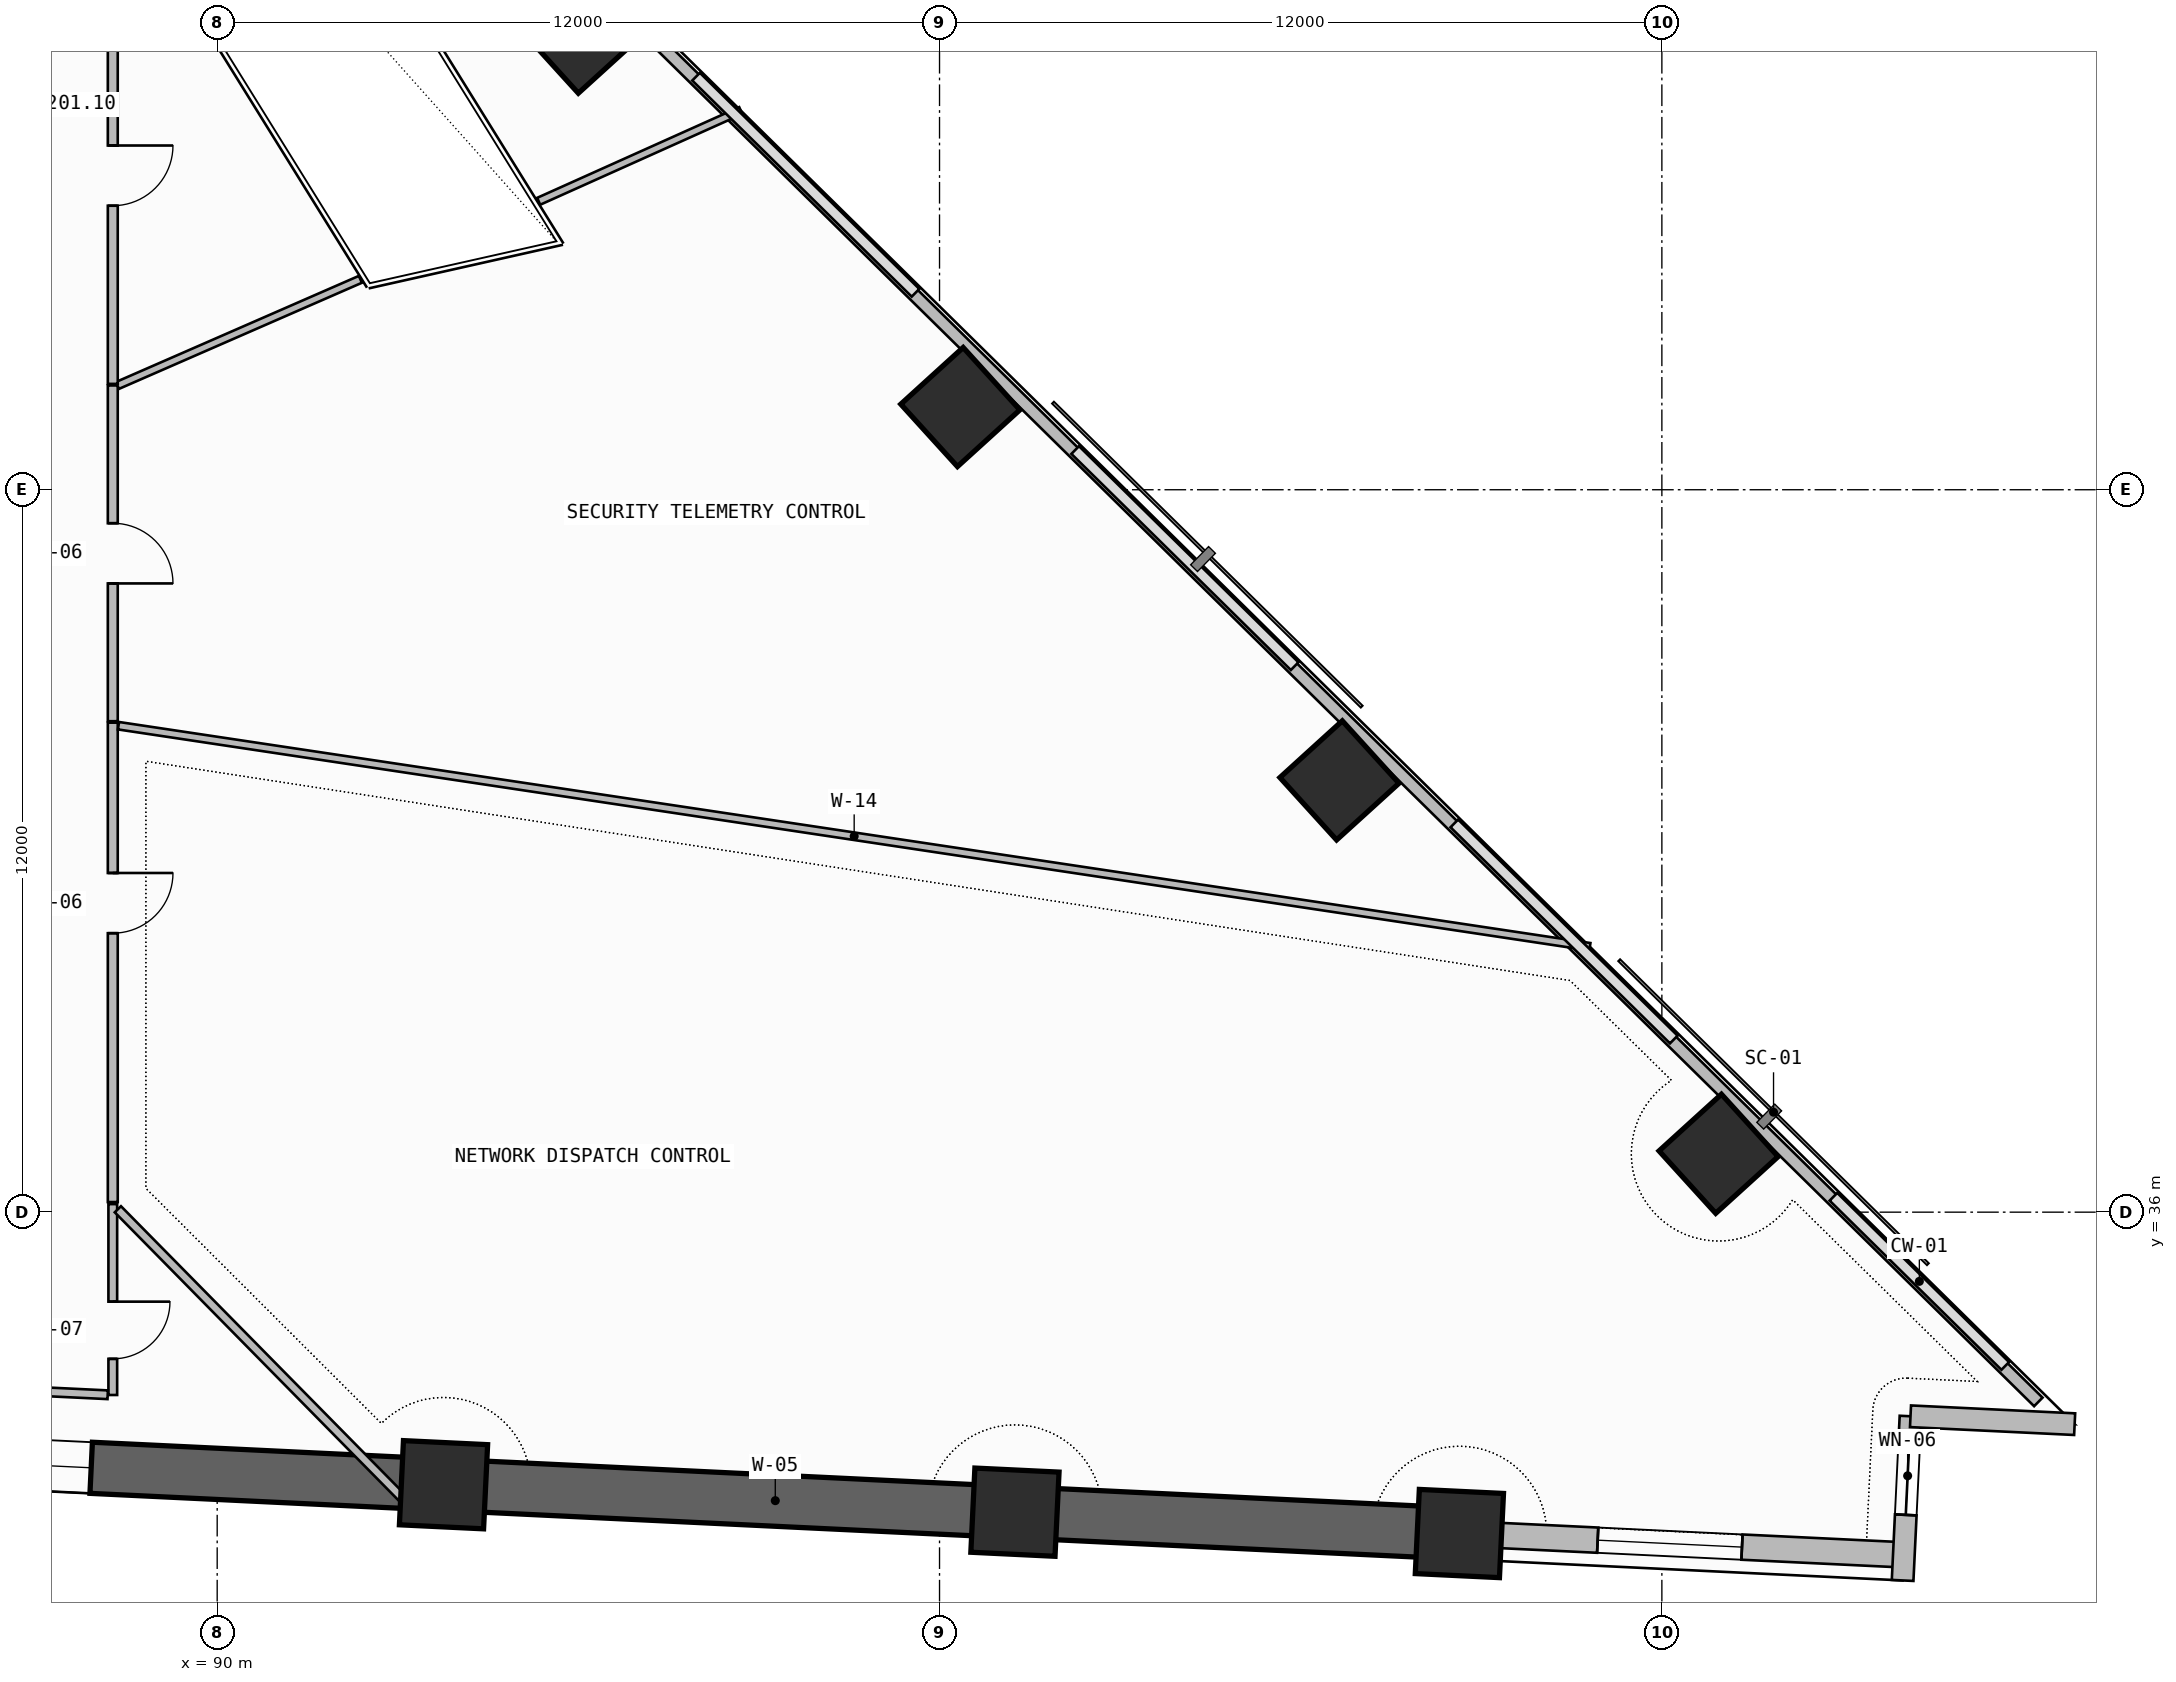
"""IFC4 building model, lengths in metres.
Left out: names, types, materials, properties, quantities, classifications, styles, units other than length and angle.
Written with IfcOpenShell. Run it as: python <this file> out.ifc"""

import sys

from ifc_helpers import new_model, si_unit, direction, frame, frame_2d, origin, origin_2d, place, context, subcontext, project, spatial, rectangle, extrude, element, fill, save


model = new_model("IFC4")
c1 = context("Model", 3, precision=1e-05, world=origin(), true_north=direction((0.0, 1.0)))
c2 = subcontext(c1, "Body", "Model", "MODEL_VIEW")
j1 = project(units=[si_unit("LENGTHUNIT", "METRE"), si_unit("PLANEANGLEUNIT", "RADIAN")], contexts=[c1])
p1 = place(None, origin())
s1 = spatial("IfcSite", under=j1, at=p1, CompositionType="ELEMENT")
p2 = place(p1, origin())
s2 = spatial("IfcBuilding", under=s1, at=p2, CompositionType="ELEMENT")
p3 = place(p2, frame((0.0, 0.0, 33.9)))
s3 = spatial("IfcBuildingStorey", under=s2, at=p3, CompositionType="ELEMENT", Elevation=33.9)
for number, where, z_axis, x_axis in (
    (1, (93.76, 31.472, 0.0), (0.0, 0.0, 1.0), (-0.999, 0.048, 0.0)),
    (2, (103.253, 31.017, 0.0), (0.0, 0.0, 1.0), (-0.999, 0.048, 0.0)),
    (3, (110.636, 30.662, 0.0), (0.0, 0.0, 1.0), (-0.999, 0.048, 0.0)),
    (4, (114.942, 36.97, 0.0), (0.0, 0.0, 1.0), (0.74, 0.672, 0.0)),
    (5, (108.644, 43.172, 0.0), (0.0, 0.0, 1.0), (0.74, 0.672, 0.0)),
    (6, (102.345, 49.374, 0.0), (0.0, 0.0, 1.0), (0.74, 0.672, 0.0)),
    (7, (96.047, 55.576, 0.0), (0.0, 0.0, 1.0), (0.74, 0.672, 0.0)),
):
    element("IfcColumn", number, at=place(p3, frame(where, z_axis=z_axis, x_axis=x_axis)), inside=s3, PredefinedType="COLUMN", context=c2, shape_type="SweptSolid", body=[
        extrude(rectangle(XDim=1.4, YDim=1.4, at=origin_2d()), origin(), (0.0, 0.0, 1.0), 3.6),
    ])
p4 = place(p3, frame((83.212, 31.979, -0.2), z_axis=(0.0, 0.0, 1.0), x_axis=(0.998848235141, -0.047981279227, 0.0)))
e8 = element("IfcWall", 8, at=p4, inside=s3, PredefinedType="SHEAR", context=c2, shape_type="SweptSolid", body=[
    extrude(rectangle(XDim=27.456, YDim=0.85, at=frame_2d((13.728, 0.0))), origin(), (0.0, 0.0, 1.0), 3.54),
])
p5 = place(p4, frame((2.3, 0.0, 1.2)))
e9 = element("IfcOpeningElement", 9, at=p5, cuts=e8, PredefinedType="OPENING", context=c2, shape_type="SweptSolid", body=[
    extrude(rectangle(XDim=2.4, YDim=0.9, at=frame_2d((1.2, 0.45))), frame((0.0, 0.435, 0.0), z_axis=(0.0, -1.0, 0.0), x_axis=(1.0, 0.0, 0.0)), (0.0, 0.0, 1.0), 0.87),
])
p6 = place(p3, frame((110.636, 30.662, 0.0), z_axis=(0.0, 0.0, 1.0), x_axis=(0.998847872759, -0.047988822508, 0.0)))
e10 = element("IfcWall", 10, at=p6, inside=s3, PredefinedType="SOLIDWALL", context=c2, shape_type="SweptSolid", body=[
    extrude(rectangle(XDim=7.392, YDim=0.42, at=frame_2d((3.696, 0.0))), origin(), (0.0, 0.0, 1.0), 2.325),
])
p7 = place(p6, frame((2.3, 0.0, 1.2)))
e11 = element("IfcOpeningElement", 11, at=p7, cuts=e10, PredefinedType="OPENING", context=c2, shape_type="SweptSolid", body=[
    extrude(rectangle(XDim=2.4, YDim=0.9, at=frame_2d((1.2, 0.45))), frame((0.0, 0.22, 0.0), z_axis=(0.0, -1.0, 0.0), x_axis=(1.0, 0.0, 0.0)), (0.0, 0.0, 1.0), 0.44),
])
p8 = place(p3, frame((118.0, 29.883, 0.0), z_axis=(0.0, 0.0, 1.0), x_axis=(0.048024030708, 0.998846180588, 0.0)))
e12 = element("IfcWall", 12, at=p8, inside=s3, PredefinedType="SOLIDWALL", context=c2, shape_type="SweptSolid", body=[
    extrude(rectangle(XDim=2.73, YDim=0.36, at=frame_2d((1.365, 0.0))), origin(), (0.0, 0.0, 1.0), 3.34),
])
p9 = place(p8, frame((1.09, 0.0, 0.45)))
e13 = element("IfcOpeningElement", 13, at=p9, cuts=e12, PredefinedType="OPENING", context=c2, shape_type="SweptSolid", body=[
    extrude(rectangle(XDim=1.3, YDim=2.4, at=frame_2d((0.65, 1.2))), frame((0.0, 0.19, 0.0), z_axis=(0.0, -1.0, 0.0), x_axis=(1.0, 0.0, 0.0)), (0.0, 0.0, 1.0), 0.38),
])
p10 = place(p3, frame((118.131, 32.61, 0.0), z_axis=(0.0, 0.0, 1.0), x_axis=(0.998846180588, -0.048024030708, 0.0)))
e14 = element("IfcWall", 14, at=p10, inside=s3, PredefinedType="SOLIDWALL", context=c2, shape_type="SweptSolid", body=[
    extrude(rectangle(XDim=2.73, YDim=0.36, at=frame_2d((1.365, 0.0))), origin(), (0.0, 0.0, 1.0), 3.34),
])
p11 = place(p3, frame((120.254, 32.848, 0.0), z_axis=(0.0, 0.0, 1.0), x_axis=(-0.71254385441, 0.701627576099, 0.0)))
e15 = element("IfcWall", 15, at=p11, inside=s3, PredefinedType="PARAPET", context=c2, shape_type="SweptSolid", body=[
    extrude(rectangle(XDim=36.142, YDim=0.2, at=frame_2d((18.071, 0.0))), origin(), (0.0, 0.0, 1.0), 1.15),
])
p12 = place(p3, frame((88.266, 32.963, 0.0), z_axis=(0.0, 0.0, 1.0), x_axis=(0.0, 1.0, 0.0)))
e16 = element("IfcWall", 16, at=p12, inside=s3, PredefinedType="PARTITIONING", context=c2, shape_type="SweptSolid", body=[
    extrude(rectangle(XDim=3.171, YDim=0.145, at=frame_2d((1.585, 0.0))), origin(), (0.0, 0.0, 1.0), 2.725),
])
p13 = place(p12, frame((0.601, 0.0, 0.0)))
e17 = element("IfcOpeningElement", 17, at=p13, cuts=e16, PredefinedType="OPENING", context=c2, shape_type="SweptSolid", body=[
    extrude(rectangle(XDim=0.95, YDim=2.15, at=frame_2d((0.475, 1.075))), frame((0.0, 0.083, 0.0), z_axis=(0.0, -1.0, 0.0), x_axis=(1.0, 0.0, 0.0)), (0.0, 0.0, 1.0), 0.165),
])
p14 = place(p3, frame((86.3, 33.057, 0.0), z_axis=(0.0, 0.0, 1.0), x_axis=(0.998848993308, -0.047965493514, 0.0)))
e18 = element("IfcWall", 18, at=p14, inside=s3, PredefinedType="PARTITIONING", context=c2, shape_type="SweptSolid", body=[
    extrude(rectangle(XDim=1.883, YDim=0.145, at=frame_2d((0.942, 0.0))), origin(), (0.0, 0.0, 1.0), 3.34),
])
p15 = place(p3, frame((88.35, 36.048, 0.0), z_axis=(0.0, 0.0, 1.0), x_axis=(0.701810322679, -0.712363861366, 0.0)))
e19 = element("IfcWall", 19, at=p15, inside=s3, PredefinedType="PARTITIONING", context=c2, shape_type="SweptSolid", body=[
    extrude(rectangle(XDim=6.986, YDim=0.145, at=frame_2d((3.493, 0.0))), origin(), (0.0, 0.0, 1.0), 2.325),
])
p16 = place(p3, frame((88.266, 36.168, 0.0), z_axis=(0.0, 0.0, 1.0), x_axis=(0.0, 1.0, 0.0)))
e20 = element("IfcWall", 20, at=p16, inside=s3, PredefinedType="PARTITIONING", context=c2, shape_type="SweptSolid", body=[
    extrude(rectangle(XDim=7.963, YDim=0.165, at=frame_2d((3.982, 0.0))), origin(), (0.0, 0.0, 1.0), 2.725),
])
p17 = place(p16, frame((4.466, 0.0, 0.0)))
e21 = element("IfcOpeningElement", 21, at=p17, cuts=e20, PredefinedType="OPENING", context=c2, shape_type="SweptSolid", body=[
    extrude(rectangle(XDim=1.0, YDim=2.2, at=frame_2d((0.5, 1.1))), frame((0.0, 0.093, 0.0), z_axis=(0.0, -1.0, 0.0), x_axis=(1.0, 0.0, 0.0)), (0.0, 0.0, 1.0), 0.185),
])
p18 = place(p3, frame((88.36, 44.08, 0.0), z_axis=(0.0, 0.0, 1.0), x_axis=(0.988906339376, -0.148540405084, 0.0)))
e22 = element("IfcWall", 22, at=p18, inside=s3, PredefinedType="PARTITIONING", context=c2, shape_type="SweptSolid", body=[
    extrude(rectangle(XDim=24.718, YDim=0.125, at=frame_2d((12.359, 0.0))), origin(), (0.0, 0.0, 1.0), 2.725),
])
p19 = place(p3, frame((88.266, 44.155, 0.0), z_axis=(0.0, 0.0, 1.0), x_axis=(0.0, 1.0, 0.0)))
e23 = element("IfcWall", 23, at=p19, inside=s3, PredefinedType="PARTITIONING", context=c2, shape_type="SweptSolid", body=[
    extrude(rectangle(XDim=5.577, YDim=0.165, at=frame_2d((2.789, 0.0))), origin(), (0.0, 0.0, 1.0), 2.725),
])
p20 = place(p19, frame((2.289, 0.0, 0.0)))
e24 = element("IfcOpeningElement", 24, at=p20, cuts=e23, PredefinedType="OPENING", context=c2, shape_type="SweptSolid", body=[
    extrude(rectangle(XDim=1.0, YDim=2.2, at=frame_2d((0.5, 1.1))), frame((0.0, 0.093, 0.0), z_axis=(0.0, -1.0, 0.0), x_axis=(1.0, 0.0, 0.0)), (0.0, 0.0, 1.0), 0.185),
])
p21 = place(p3, frame((88.343, 49.732, 0.0), z_axis=(0.0, 0.0, 1.0), x_axis=(0.916407797911, 0.40024585935, 0.0)))
e25 = element("IfcWall", 25, at=p21, inside=s3, PredefinedType="PARTITIONING", context=c2, shape_type="SweptSolid", body=[
    extrude(rectangle(XDim=4.404, YDim=0.125, at=frame_2d((2.202, 0.0))), origin(), (0.0, 0.0, 1.0), 2.875),
])
p22 = place(p3, frame((95.341, 52.791, 0.0), z_axis=(0.0, 0.0, 1.0), x_axis=(0.912267509973, 0.409594909939, 0.0)))
e26 = element("IfcWall", 26, at=p22, inside=s3, PredefinedType="PARTITIONING", context=c2, shape_type="SweptSolid", body=[
    extrude(rectangle(XDim=3.68, YDim=0.125, at=frame_2d((1.84, 0.0))), origin(), (0.0, 0.0, 1.0), 2.725),
])
p23 = place(p3, frame((88.266, 49.758, 0.0), z_axis=(0.0, 0.0, 1.0), x_axis=(0.0, 1.0, 0.0)))
e27 = element("IfcWall", 27, at=p23, inside=s3, PredefinedType="PARTITIONING", context=c2, shape_type="SweptSolid", body=[
    extrude(rectangle(XDim=9.284, YDim=0.165, at=frame_2d((4.642, 0.0))), origin(), (0.0, 0.0, 1.0), 2.725),
])
p24 = place(p23, frame((2.959, 0.0, 0.0)))
e28 = element("IfcOpeningElement", 28, at=p24, cuts=e27, PredefinedType="OPENING", context=c2, shape_type="SweptSolid", body=[
    extrude(rectangle(XDim=1.0, YDim=2.2, at=frame_2d((0.5, 1.1))), frame((0.0, 0.093, 0.0), z_axis=(0.0, -1.0, 0.0), x_axis=(1.0, 0.0, 0.0)), (0.0, 0.0, 1.0), 0.185),
])
p25 = place(p5, origin())
e29 = element("IfcWindow", 29, at=p25, inside=s3, PartitioningType="SINGLE_PANEL", PredefinedType="WINDOW", context=c2, shape_type="SweptSolid", body=[
    extrude(rectangle(XDim=2.4, YDim=0.9, at=frame_2d((1.2, 0.45))), frame((0.0, 0.03, 0.0), z_axis=(0.0, -1.0, 0.0), x_axis=(1.0, 0.0, 0.0)), (0.0, 0.0, 1.0), 0.06),
])
fill(e9, e29)
p26 = place(p7, origin())
e30 = element("IfcWindow", 30, at=p26, inside=s3, PartitioningType="SINGLE_PANEL", PredefinedType="WINDOW", context=c2, shape_type="SweptSolid", body=[
    extrude(rectangle(XDim=2.4, YDim=0.9, at=frame_2d((1.2, 0.45))), frame((0.0, 0.03, 0.0), z_axis=(0.0, -1.0, 0.0), x_axis=(1.0, 0.0, 0.0)), (0.0, 0.0, 1.0), 0.06),
])
fill(e11, e30)
p27 = place(p9, origin())
e31 = element("IfcWindow", 31, at=p27, inside=s3, PartitioningType="SINGLE_PANEL", PredefinedType="WINDOW", context=c2, shape_type="SweptSolid", body=[
    extrude(rectangle(XDim=1.3, YDim=2.4, at=frame_2d((0.65, 1.2))), frame((0.0, 0.03, 0.0), z_axis=(0.0, -1.0, 0.0), x_axis=(1.0, 0.0, 0.0)), (0.0, 0.0, 1.0), 0.06),
])
fill(e13, e31)
p28 = place(p13, frame((0.95, 0.0, 0.0), z_axis=(0.0, 0.0, 1.0), x_axis=(-1.0, 0.0, 0.0)))
e32 = element("IfcDoor", 32, at=p28, inside=s3, OperationType="SINGLE_SWING_LEFT", PredefinedType="DOOR", context=c2, shape_type="SweptSolid", body=[
    extrude(rectangle(XDim=0.95, YDim=2.15, at=frame_2d((0.475, 1.075))), frame((0.0, 0.025, 0.0), z_axis=(0.0, -1.0, 0.0), x_axis=(1.0, 0.0, 0.0)), (0.0, 0.0, 1.0), 0.05),
])
fill(e17, e32)
p29 = place(p17, frame((1.0, 0.0, 0.0), z_axis=(0.0, 0.0, 1.0), x_axis=(-1.0, 0.0, 0.0)))
e33 = element("IfcDoor", 33, at=p29, inside=s3, OperationType="SINGLE_SWING_LEFT", PredefinedType="DOOR", context=c2, shape_type="SweptSolid", body=[
    extrude(rectangle(XDim=1.0, YDim=2.2, at=frame_2d((0.5, 1.1))), frame((0.0, 0.025, 0.0), z_axis=(0.0, -1.0, 0.0), x_axis=(1.0, 0.0, 0.0)), (0.0, 0.0, 1.0), 0.05),
])
fill(e21, e33)
p30 = place(p20, frame((1.0, 0.0, 0.0), z_axis=(0.0, 0.0, 1.0), x_axis=(-1.0, 0.0, 0.0)))
e34 = element("IfcDoor", 34, at=p30, inside=s3, OperationType="SINGLE_SWING_RIGHT", PredefinedType="DOOR", context=c2, shape_type="SweptSolid", body=[
    extrude(rectangle(XDim=1.0, YDim=2.2, at=frame_2d((0.5, 1.1))), frame((0.0, 0.025, 0.0), z_axis=(0.0, -1.0, 0.0), x_axis=(1.0, 0.0, 0.0)), (0.0, 0.0, 1.0), 0.05),
])
fill(e24, e34)
p31 = place(p24, frame((1.0, 0.0, 0.0), z_axis=(0.0, 0.0, 1.0), x_axis=(-1.0, 0.0, 0.0)))
e35 = element("IfcDoor", 35, at=p31, inside=s3, OperationType="SINGLE_SWING_LEFT", PredefinedType="DOOR", context=c2, shape_type="SweptSolid", body=[
    extrude(rectangle(XDim=1.0, YDim=2.2, at=frame_2d((0.5, 1.1))), frame((0.0, 0.025, 0.0), z_axis=(0.0, -1.0, 0.0), x_axis=(1.0, 0.0, 0.0)), (0.0, 0.0, 1.0), 0.05),
])
fill(e28, e35)
save(model, sys.argv[1])
